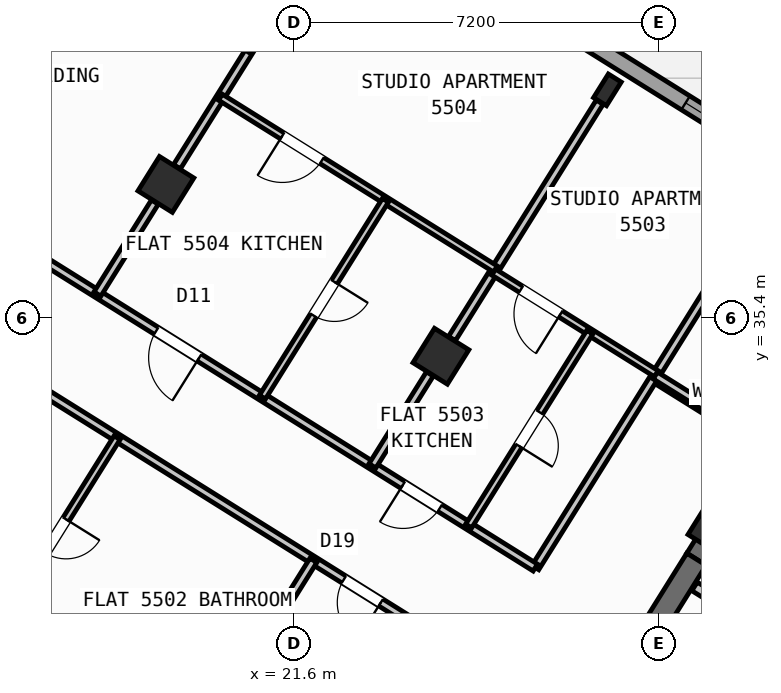
"""IFC4 building model, lengths in metres.
Left out: names, types, materials, properties, quantities, classifications, styles, units other than length and angle.
Written with IfcOpenShell. Run it as: python <this file> out.ifc"""

import sys

from ifc_helpers import new_model, si_unit, direction, frame, frame_2d, origin, origin_2d, place, context, subcontext, project, spatial, rectangle, hollow_rectangle, i_section, extrude, source, transform, mapped, element, fill, save


model = new_model("IFC4")
c1 = context("Model", 3, precision=1e-05, world=origin(), true_north=direction((0.0, 1.0)))
c2 = subcontext(c1, "Body", "Model", "MODEL_VIEW")
j1 = project(units=[si_unit("LENGTHUNIT", "METRE"), si_unit("PLANEANGLEUNIT", "RADIAN")], contexts=[c1])
p1 = place(None, origin())
s1 = spatial("IfcSite", under=j1, at=p1, CompositionType="ELEMENT")
p2 = place(p1, origin())
s2 = spatial("IfcBuilding", under=s1, at=p2, CompositionType="ELEMENT")
p3 = place(p2, frame((0.0, 0.0, 218.4)))
s3 = spatial("IfcBuildingStorey", under=s2, at=p3, CompositionType="ELEMENT", Elevation=218.4)
p4 = place(p3, frame((40.531, 24.036, 0.0), z_axis=(0.0, 0.0, 1.0), x_axis=(-0.848048787466, 0.529918157905, 0.0)))
e1 = element("IfcWall", 1, at=p4, inside=s3, PredefinedType="SHEAR", context=c2, shape_type="SweptSolid", body=[
    extrude(rectangle(XDim=13.04, YDim=0.45, at=frame_2d((6.52, 0.0))), origin(), (0.0, 0.0, 1.0), 3.35),
])
p5 = place(p3, frame((29.544, 30.636, 0.0), z_axis=(0.0, 0.0, 1.0), x_axis=(-0.529902075036, -0.848058836916, 0.0)))
e2 = element("IfcWall", 2, at=p5, inside=s3, PredefinedType="SHEAR", context=c2, shape_type="SweptSolid", body=[
    extrude(rectangle(XDim=3.625, YDim=0.45, at=frame_2d((1.812, 0.0))), origin(), (0.0, 0.0, 1.0), 3.35),
])
m1 = source(origin(), c2, "Body", "SweptSolid", [
    extrude(hollow_rectangle(XDim=0.8, YDim=0.8, WallThickness=0.032, at=origin_2d()), origin(), (0.0, 0.0, 1.0), 3.6),
])
p6 = place(p3, frame((29.928, 31.251, 0.0), z_axis=(0.0, 0.0, 1.0), x_axis=(-0.848048096156, 0.529919264233, 0.0)))
e3 = element("IfcColumn", 3, at=p6, inside=s3, PredefinedType="COLUMN", context=c2, shape_type="MappedRepresentation", body=[
    mapped(m1, transform((0.0, 0.0, 0.0), scale=1.0)),
])
m2 = source(origin(), c2, "Body", "SweptSolid", [
    extrude(i_section(OverallWidth=0.3, OverallDepth=0.55, WebThickness=0.015, FlangeThickness=0.029, at=origin_2d()), origin(), (0.0, 0.0, 1.0), 3.6),
])
p7 = place(p3, frame((27.786, 39.901, 0.0), z_axis=(0.0, 0.0, 1.0), x_axis=(-0.848048096156, 0.529919264233, 0.0)))
e4 = element("IfcColumn", 4, at=p7, inside=s3, PredefinedType="COLUMN", context=c2, shape_type="MappedRepresentation", body=[
    mapped(m2, transform((0.0, 0.0, 0.0), scale=1.0)),
])
for number, where, z_axis, x_axis in (
    (5, (24.5, 34.643, 0.0), (0.0, 0.0, 1.0), (-0.848, 0.53, 0.0)),
    (6, (19.073, 38.034, 0.0), (0.0, 0.0, 1.0), (-0.848, 0.53, 0.0)),
):
    element("IfcColumn", number, at=place(p3, frame(where, z_axis=z_axis, x_axis=x_axis)), inside=s3, PredefinedType="COLUMN", context=c2, shape_type="MappedRepresentation", body=[
        mapped(m1, transform((0.0, 0.0, 0.0), scale=1.0)),
    ])
p8 = place(p3, frame((5.7, 28.71, 0.0), z_axis=(0.0, 0.0, 1.0), x_axis=(0.529923711467, 0.8480453172, 0.0)))
e7 = element("IfcWall", 7, at=p8, inside=s3, PredefinedType="STANDARD", context=c2, shape_type="SweptSolid", body=[
    extrude(rectangle(XDim=21.587, YDim=0.32, at=frame_2d((10.794, 0.0))), origin(), (0.0, 0.0, 1.0), 2.825),
])
p9 = place(p8, frame((2.319, 0.0, 0.9)))
e8 = element("IfcOpeningElement", 8, at=p9, cuts=e7, PredefinedType="OPENING", context=c2, shape_type="SweptSolid", body=[
    extrude(rectangle(XDim=1.65, YDim=1.45, at=frame_2d((0.825, 0.725))), frame((0.0, 0.17, 0.0), z_axis=(0.0, -1.0, 0.0), x_axis=(1.0, 0.0, 0.0)), (0.0, 0.0, 1.0), 0.34),
])
p10 = place(p8, frame((8.629, 0.0, 1.0)))
e9 = element("IfcOpeningElement", 9, at=p10, cuts=e7, PredefinedType="OPENING", context=c2, shape_type="SweptSolid", body=[
    extrude(rectangle(XDim=0.9, YDim=1.25, at=frame_2d((0.45, 0.625))), frame((0.0, 0.17, 0.0), z_axis=(0.0, -1.0, 0.0), x_axis=(1.0, 0.0, 0.0)), (0.0, 0.0, 1.0), 0.34),
])
p11 = place(p8, frame((13.159, 0.0, 1.0)))
e10 = element("IfcOpeningElement", 10, at=p11, cuts=e7, PredefinedType="OPENING", context=c2, shape_type="SweptSolid", body=[
    extrude(rectangle(XDim=0.9, YDim=1.25, at=frame_2d((0.45, 0.625))), frame((0.0, 0.17, 0.0), z_axis=(0.0, -1.0, 0.0), x_axis=(1.0, 0.0, 0.0)), (0.0, 0.0, 1.0), 0.34),
])
p12 = place(p8, frame((16.232, 0.0, 1.0)))
e11 = element("IfcOpeningElement", 11, at=p12, cuts=e7, PredefinedType="OPENING", context=c2, shape_type="SweptSolid", body=[
    extrude(rectangle(XDim=0.9, YDim=1.25, at=frame_2d((0.45, 0.625))), frame((0.0, 0.17, 0.0), z_axis=(0.0, -1.0, 0.0), x_axis=(1.0, 0.0, 0.0)), (0.0, 0.0, 1.0), 0.34),
])
p13 = place(p8, frame((18.925, 0.0, 0.9)))
e12 = element("IfcOpeningElement", 12, at=p13, cuts=e7, PredefinedType="OPENING", context=c2, shape_type="SweptSolid", body=[
    extrude(rectangle(XDim=1.35, YDim=1.45, at=frame_2d((0.675, 0.725))), frame((0.0, 0.17, 0.0), z_axis=(0.0, -1.0, 0.0), x_axis=(1.0, 0.0, 0.0)), (0.0, 0.0, 1.0), 0.34),
])
p14 = place(p3, frame((17.424, 47.083, 0.0), z_axis=(0.0, 0.0, 1.0), x_axis=(0.848049927979, -0.529916332693, 0.0)))
e13 = element("IfcWall", 13, at=p14, inside=s3, PredefinedType="STANDARD", context=c2, shape_type="SweptSolid", body=[
    extrude(rectangle(XDim=29.223, YDim=0.32, at=frame_2d((14.612, 0.0))), origin(), (0.0, 0.0, 1.0), 3.35),
])
p15 = place(p14, frame((3.77, 0.0, 0.0)))
e14 = element("IfcOpeningElement", 14, at=p15, cuts=e13, PredefinedType="OPENING", context=c2, shape_type="SweptSolid", body=[
    extrude(rectangle(XDim=1.05, YDim=2.15, at=frame_2d((0.525, 1.075))), frame((0.0, 0.17, 0.0), z_axis=(0.0, -1.0, 0.0), x_axis=(1.0, 0.0, 0.0)), (0.0, 0.0, 1.0), 0.34),
])
p16 = place(p14, frame((1.125, 0.0, 0.9)))
e15 = element("IfcOpeningElement", 15, at=p16, cuts=e13, PredefinedType="OPENING", context=c2, shape_type="SweptSolid", body=[
    extrude(rectangle(XDim=1.65, YDim=1.45, at=frame_2d((0.825, 0.725))), frame((0.0, 0.17, 0.0), z_axis=(0.0, -1.0, 0.0), x_axis=(1.0, 0.0, 0.0)), (0.0, 0.0, 1.0), 0.34),
])
p17 = place(p14, frame((7.384, 0.0, 0.9)))
e16 = element("IfcOpeningElement", 16, at=p17, cuts=e13, PredefinedType="OPENING", context=c2, shape_type="SweptSolid", body=[
    extrude(rectangle(XDim=1.35, YDim=1.45, at=frame_2d((0.675, 0.725))), frame((0.0, 0.17, 0.0), z_axis=(0.0, -1.0, 0.0), x_axis=(1.0, 0.0, 0.0)), (0.0, 0.0, 1.0), 0.34),
])
p18 = place(p14, frame((10.054, 0.0, 0.9)))
e17 = element("IfcOpeningElement", 17, at=p18, cuts=e13, PredefinedType="OPENING", context=c2, shape_type="SweptSolid", body=[
    extrude(rectangle(XDim=1.35, YDim=1.45, at=frame_2d((0.675, 0.725))), frame((0.0, 0.17, 0.0), z_axis=(0.0, -1.0, 0.0), x_axis=(1.0, 0.0, 0.0)), (0.0, 0.0, 1.0), 0.34),
])
p19 = place(p14, frame((14.039, 0.0, 1.0)))
e18 = element("IfcOpeningElement", 18, at=p19, cuts=e13, PredefinedType="OPENING", context=c2, shape_type="SweptSolid", body=[
    extrude(rectangle(XDim=0.9, YDim=1.25, at=frame_2d((0.45, 0.625))), frame((0.0, 0.17, 0.0), z_axis=(0.0, -1.0, 0.0), x_axis=(1.0, 0.0, 0.0)), (0.0, 0.0, 1.0), 0.34),
])
p20 = place(p14, frame((17.254, 0.0, 1.0)))
e19 = element("IfcOpeningElement", 19, at=p20, cuts=e13, PredefinedType="OPENING", context=c2, shape_type="SweptSolid", body=[
    extrude(rectangle(XDim=0.9, YDim=1.25, at=frame_2d((0.45, 0.625))), frame((0.0, 0.17, 0.0), z_axis=(0.0, -1.0, 0.0), x_axis=(1.0, 0.0, 0.0)), (0.0, 0.0, 1.0), 0.34),
])
p21 = place(p14, frame((20.161, 0.0, 0.9)))
e20 = element("IfcOpeningElement", 20, at=p21, cuts=e13, PredefinedType="OPENING", context=c2, shape_type="SweptSolid", body=[
    extrude(rectangle(XDim=1.35, YDim=1.45, at=frame_2d((0.675, 0.725))), frame((0.0, 0.17, 0.0), z_axis=(0.0, -1.0, 0.0), x_axis=(1.0, 0.0, 0.0)), (0.0, 0.0, 1.0), 0.34),
])
p22 = place(p14, frame((22.846, 0.0, 0.9)))
e21 = element("IfcOpeningElement", 21, at=p22, cuts=e13, PredefinedType="OPENING", context=c2, shape_type="SweptSolid", body=[
    extrude(rectangle(XDim=1.35, YDim=1.45, at=frame_2d((0.675, 0.725))), frame((0.0, 0.17, 0.0), z_axis=(0.0, -1.0, 0.0), x_axis=(1.0, 0.0, 0.0)), (0.0, 0.0, 1.0), 0.34),
])
p23 = place(p14, frame((26.898, 0.0, 1.0)))
e22 = element("IfcOpeningElement", 22, at=p23, cuts=e13, PredefinedType="OPENING", context=c2, shape_type="SweptSolid", body=[
    extrude(rectangle(XDim=0.9, YDim=1.25, at=frame_2d((0.45, 0.625))), frame((0.0, 0.17, 0.0), z_axis=(0.0, -1.0, 0.0), x_axis=(1.0, 0.0, 0.0)), (0.0, 0.0, 1.0), 0.34),
])
p24 = place(p3, frame((33.363, 27.69, 0.0), z_axis=(0.0, 0.0, 1.0), x_axis=(-0.84804957148, 0.529916903215, 0.0)))
e23 = element("IfcWall", 23, at=p24, inside=s3, PredefinedType="STANDARD", context=c2, shape_type="SweptSolid", body=[
    extrude(rectangle(XDim=4.548, YDim=0.2, at=frame_2d((2.274, 0.0))), origin(), (0.0, 0.0, 1.0), 3.34),
])
p25 = place(p3, frame((30.914, 32.829, 0.0), z_axis=(0.0, 0.0, 1.0), x_axis=(-0.848008813643, 0.529982124211, 0.0)))
e24 = element("IfcWall", 24, at=p25, inside=s3, PredefinedType="PARTITIONING", context=c2, shape_type="SweptSolid", body=[
    extrude(rectangle(XDim=2.61, YDim=0.16, at=frame_2d((1.305, 0.0))), origin(), (0.0, 0.0, 1.0), 3.34),
])
p26 = place(p3, frame((31.239, 38.274, 0.0), z_axis=(0.0, 0.0, 1.0), x_axis=(-0.529920220799, -0.848047498427, 0.0)))
e25 = element("IfcWall", 25, at=p26, inside=s3, PredefinedType="PARTITIONING", context=c2, shape_type="SweptSolid", body=[
    extrude(rectangle(XDim=9.2, YDim=0.16, at=frame_2d((4.6, 0.0))), origin(), (0.0, 0.0, 1.0), 3.34),
])
p27 = place(p3, frame((26.363, 30.472, 0.0), z_axis=(0.0, 0.0, 1.0), x_axis=(-0.848052408131, 0.529912363569, 0.0)))
e26 = element("IfcWall", 26, at=p27, inside=s3, PredefinedType="PARTITIONING", context=c2, shape_type="SweptSolid", body=[
    extrude(rectangle(XDim=16.73, YDim=0.16, at=frame_2d((8.365, 0.0))), origin(), (0.0, 0.0, 1.0), 3.34),
])
p28 = place(p27, frame((2.22, 0.0, 0.0)))
e27 = element("IfcOpeningElement", 27, at=p28, cuts=e26, PredefinedType="OPENING", context=c2, shape_type="SweptSolid", body=[
    extrude(rectangle(XDim=0.86, YDim=2.05, at=frame_2d((0.43, 1.025))), frame((0.0, 0.09, 0.0), z_axis=(0.0, -1.0, 0.0), x_axis=(1.0, 0.0, 0.0)), (0.0, 0.0, 1.0), 0.18),
])
p29 = place(p27, frame((7.82, 0.0, 0.0)))
e28 = element("IfcOpeningElement", 28, at=p29, cuts=e26, PredefinedType="OPENING", context=c2, shape_type="SweptSolid", body=[
    extrude(rectangle(XDim=1.0, YDim=2.1, at=frame_2d((0.5, 1.05))), frame((0.0, 0.09, 0.0), z_axis=(0.0, -1.0, 0.0), x_axis=(1.0, 0.0, 0.0)), (0.0, 0.0, 1.0), 0.18),
])
p30 = place(p27, frame((12.95, 0.0, 0.0)))
e29 = element("IfcOpeningElement", 29, at=p30, cuts=e26, PredefinedType="OPENING", context=c2, shape_type="SweptSolid", body=[
    extrude(rectangle(XDim=1.0, YDim=2.1, at=frame_2d((0.5, 1.05))), frame((0.0, 0.09, 0.0), z_axis=(0.0, -1.0, 0.0), x_axis=(1.0, 0.0, 0.0)), (0.0, 0.0, 1.0), 0.18),
])
p31 = place(p3, frame((25.198, 28.606, 0.0), z_axis=(0.0, 0.0, 1.0), x_axis=(-0.848052408131, 0.529912363569, 0.0)))
e30 = element("IfcWall", 30, at=p31, inside=s3, PredefinedType="PARTITIONING", context=c2, shape_type="SweptSolid", body=[
    extrude(rectangle(XDim=16.73, YDim=0.16, at=frame_2d((8.365, 0.0))), origin(), (0.0, 0.0, 1.0), 3.34),
])
p32 = place(p31, frame((2.22, 0.0, 0.0)))
e31 = element("IfcOpeningElement", 31, at=p32, cuts=e30, PredefinedType="OPENING", context=c2, shape_type="SweptSolid", body=[
    extrude(rectangle(XDim=0.86, YDim=2.05, at=frame_2d((0.43, 1.025))), frame((0.0, 0.09, 0.0), z_axis=(0.0, -1.0, 0.0), x_axis=(1.0, 0.0, 0.0)), (0.0, 0.0, 1.0), 0.18),
])
p33 = place(p31, frame((12.084, 0.0, 0.0)))
e32 = element("IfcOpeningElement", 32, at=p33, cuts=e30, PredefinedType="OPENING", context=c2, shape_type="SweptSolid", body=[
    extrude(rectangle(XDim=1.0, YDim=2.1, at=frame_2d((0.5, 1.05))), frame((0.0, 0.09, 0.0), z_axis=(0.0, -1.0, 0.0), x_axis=(1.0, 0.0, 0.0)), (0.0, 0.0, 1.0), 0.18),
])
p34 = place(p3, frame((21.983, 30.615, 0.0), z_axis=(0.0, 0.0, 1.0), x_axis=(-0.529978410432, -0.848011134641, 0.0)))
e33 = element("IfcWall", 33, at=p34, inside=s3, PredefinedType="PARTITIONING", context=c2, shape_type="SweptSolid", body=[
    extrude(rectangle(XDim=2.138, YDim=0.16, at=frame_2d((1.069, 0.0))), origin(), (0.0, 0.0, 1.0), 2.825),
])
p35 = place(p3, frame((19.556, 26.73, 0.0), z_axis=(0.0, 0.0, 1.0), x_axis=(-0.848043949058, 0.52992590092, 0.0)))
e34 = element("IfcWall", 34, at=p35, inside=s3, PredefinedType="PLUMBINGWALL", context=c2, shape_type="SweptSolid", body=[
    extrude(rectangle(XDim=12.92, YDim=0.14, at=frame_2d((6.46, 0.0))), origin(), (0.0, 0.0, 1.0), 3.34),
])
p36 = place(p35, frame((5.849, 0.0, 0.0)))
e35 = element("IfcOpeningElement", 35, at=p36, cuts=e34, PredefinedType="OPENING", context=c2, shape_type="SweptSolid", body=[
    extrude(rectangle(XDim=0.92, YDim=2.08, at=frame_2d((0.46, 1.04))), frame((0.0, 0.08, 0.0), z_axis=(0.0, -1.0, 0.0), x_axis=(1.0, 0.0, 0.0)), (0.0, 0.0, 1.0), 0.16),
])
p37 = place(p3, frame((18.109, 33.035, 0.0), z_axis=(0.0, 0.0, 1.0), x_axis=(-0.529893526057, -0.848064178611, 0.0)))
e36 = element("IfcWall", 36, at=p37, inside=s3, PredefinedType="PLUMBINGWALL", context=c2, shape_type="SweptSolid", body=[
    extrude(rectangle(XDim=4.58, YDim=0.14, at=frame_2d((2.29, 0.0))), origin(), (0.0, 0.0, 1.0), 3.34),
])
p38 = place(p37, frame((1.9, 0.0, 0.0)))
e37 = element("IfcOpeningElement", 37, at=p38, cuts=e36, PredefinedType="OPENING", context=c2, shape_type="SweptSolid", body=[
    extrude(rectangle(XDim=0.78, YDim=2.05, at=frame_2d((0.39, 1.025))), frame((0.0, 0.08, 0.0), z_axis=(0.0, -1.0, 0.0), x_axis=(1.0, 0.0, 0.0)), (0.0, 0.0, 1.0), 0.16),
])
p39 = place(p3, frame((27.634, 39.657, 0.0), z_axis=(0.0, 0.0, 1.0), x_axis=(-0.529899205623, -0.848060629837, 0.0)))
e38 = element("IfcWall", 38, at=p39, inside=s3, PredefinedType="PARTITIONING", context=c2, shape_type="SweptSolid", body=[
    extrude(rectangle(XDim=5.501, YDim=0.16, at=frame_2d((2.75, 0.0))), origin(), (0.0, 0.0, 1.0), 2.825),
])
p40 = place(p3, frame((24.282, 34.293, 0.0), z_axis=(0.0, 0.0, 1.0), x_axis=(-0.529927092104, -0.84804320471, 0.0)))
e39 = element("IfcWall", 39, at=p40, inside=s3, PredefinedType="PARTITIONING", context=c2, shape_type="SweptSolid", body=[
    extrude(rectangle(XDim=2.138, YDim=0.16, at=frame_2d((1.069, 0.0))), origin(), (0.0, 0.0, 1.0), 2.825),
])
p41 = place(p3, frame((28.753, 34.297, 0.0), z_axis=(0.0, 0.0, 1.0), x_axis=(-0.848059820872, 0.529900500304, 0.0)))
e40 = element("IfcWall", 40, at=p41, inside=s3, PredefinedType="PLUMBINGWALL", context=c2, shape_type="SweptSolid", body=[
    extrude(rectangle(XDim=3.79, YDim=0.14, at=frame_2d((1.895, 0.0))), origin(), (0.0, 0.0, 1.0), 3.34),
])
p42 = place(p41, frame((2.23, 0.0, 0.0)))
e41 = element("IfcOpeningElement", 41, at=p42, cuts=e40, PredefinedType="OPENING", context=c2, shape_type="SweptSolid", body=[
    extrude(rectangle(XDim=0.92, YDim=2.08, at=frame_2d((0.46, 1.04))), frame((0.0, 0.08, 0.0), z_axis=(0.0, -1.0, 0.0), x_axis=(1.0, 0.0, 0.0)), (0.0, 0.0, 1.0), 0.16),
])
p43 = place(p3, frame((27.439, 35.118, 0.0), z_axis=(0.0, 0.0, 1.0), x_axis=(-0.529911350634, -0.84805304107, 0.0)))
e42 = element("IfcWall", 42, at=p43, inside=s3, PredefinedType="PLUMBINGWALL", context=c2, shape_type="SweptSolid", body=[
    extrude(rectangle(XDim=4.51, YDim=0.14, at=frame_2d((2.255, 0.0))), origin(), (0.0, 0.0, 1.0), 2.995),
])
p44 = place(p43, frame((1.865, 0.0, 0.0)))
e43 = element("IfcOpeningElement", 43, at=p44, cuts=e42, PredefinedType="OPENING", context=c2, shape_type="SweptSolid", body=[
    extrude(rectangle(XDim=0.78, YDim=2.05, at=frame_2d((0.39, 1.025))), frame((0.0, 0.08, 0.0), z_axis=(0.0, -1.0, 0.0), x_axis=(1.0, 0.0, 0.0)), (0.0, 0.0, 1.0), 0.16),
])
p45 = place(p3, frame((22.206, 43.049, 0.0), z_axis=(0.0, 0.0, 1.0), x_axis=(-0.529919150083, -0.848048167486, 0.0)))
e44 = element("IfcWall", 44, at=p45, inside=s3, PredefinedType="PARTITIONING", context=c2, shape_type="SweptSolid", body=[
    extrude(rectangle(XDim=5.501, YDim=0.16, at=frame_2d((2.75, 0.0))), origin(), (0.0, 0.0, 1.0), 2.825),
])
p46 = place(p3, frame((18.854, 37.685, 0.0), z_axis=(0.0, 0.0, 1.0), x_axis=(-0.52989628283, -0.848062456098, 0.0)))
e45 = element("IfcWall", 45, at=p46, inside=s3, PredefinedType="PARTITIONING", context=c2, shape_type="SweptSolid", body=[
    extrude(rectangle(XDim=2.138, YDim=0.16, at=frame_2d((1.069, 0.0))), origin(), (0.0, 0.0, 1.0), 2.825),
])
p47 = place(p3, frame((25.576, 36.365, 0.0), z_axis=(0.0, 0.0, 1.0), x_axis=(-0.848056163074, 0.529906354247, 0.0)))
e46 = element("IfcWall", 46, at=p47, inside=s3, PredefinedType="PLUMBINGWALL", context=c2, shape_type="SweptSolid", body=[
    extrude(rectangle(XDim=6.4, YDim=0.14, at=frame_2d((3.2, 0.0))), origin(), (0.0, 0.0, 1.0), 3.34),
])
p48 = place(p47, frame((4.04, 0.0, 0.0)))
e47 = element("IfcOpeningElement", 47, at=p48, cuts=e46, PredefinedType="OPENING", context=c2, shape_type="SweptSolid", body=[
    extrude(rectangle(XDim=0.92, YDim=2.08, at=frame_2d((0.46, 1.04))), frame((0.0, 0.08, 0.0), z_axis=(0.0, -1.0, 0.0), x_axis=(1.0, 0.0, 0.0)), (0.0, 0.0, 1.0), 0.16),
])
p49 = place(p3, frame((23.405, 37.721, 0.0), z_axis=(0.0, 0.0, 1.0), x_axis=(-0.529955816375, -0.848025254748, 0.0)))
e48 = element("IfcWall", 48, at=p49, inside=s3, PredefinedType="PLUMBINGWALL", context=c2, shape_type="SweptSolid", body=[
    extrude(rectangle(XDim=4.58, YDim=0.14, at=frame_2d((2.29, 0.0))), origin(), (0.0, 0.0, 1.0), 3.34),
])
p50 = place(p49, frame((1.9, 0.0, 0.0)))
e49 = element("IfcOpeningElement", 49, at=p50, cuts=e48, PredefinedType="OPENING", context=c2, shape_type="SweptSolid", body=[
    extrude(rectangle(XDim=0.78, YDim=2.05, at=frame_2d((0.39, 1.025))), frame((0.0, 0.08, 0.0), z_axis=(0.0, -1.0, 0.0), x_axis=(1.0, 0.0, 0.0)), (0.0, 0.0, 1.0), 0.16),
])
p51 = place(p3, frame((20.733, 40.69, 0.0), z_axis=(0.0, 0.0, 1.0), x_axis=(-0.848048787466, 0.529918157905, 0.0)))
e50 = element("IfcWall", 50, at=p51, inside=s3, PredefinedType="PARTITIONING", context=c2, shape_type="SweptSolid", body=[
    extrude(rectangle(XDim=6.52, YDim=0.11, at=frame_2d((3.26, 0.0))), origin(), (0.0, 0.0, 1.0), 3.34),
])
p52 = place(p51, frame((2.8, 0.0, 0.0)))
e51 = element("IfcOpeningElement", 51, at=p52, cuts=e50, PredefinedType="OPENING", context=c2, shape_type="SweptSolid", body=[
    extrude(rectangle(XDim=0.92, YDim=2.08, at=frame_2d((0.46, 1.04))), frame((0.0, 0.065, 0.0), z_axis=(0.0, -1.0, 0.0), x_axis=(1.0, 0.0, 0.0)), (0.0, 0.0, 1.0), 0.13),
])
p53 = place(p3, frame((41.936, 26.012, 0.0), z_axis=(0.0, 0.0, 1.0), x_axis=(-0.848051154596, 0.529914369676, 0.0)))
e52 = element("IfcWall", 52, at=p53, inside=s3, PredefinedType="PARTITIONING", context=c2, shape_type="SweptSolid", body=[
    extrude(rectangle(XDim=15.57, YDim=0.16, at=frame_2d((7.785, 0.0))), origin(), (0.0, 0.0, 1.0), 3.34),
])
p54 = place(p53, frame((3.415, 0.0, 0.0)))
e53 = element("IfcOpeningElement", 53, at=p54, cuts=e52, PredefinedType="OPENING", context=c2, shape_type="SweptSolid", body=[
    extrude(rectangle(XDim=1.0, YDim=2.1, at=frame_2d((0.5, 1.05))), frame((0.0, 0.09, 0.0), z_axis=(0.0, -1.0, 0.0), x_axis=(1.0, 0.0, 0.0)), (0.0, 0.0, 1.0), 0.18),
])
p55 = place(p53, frame((10.565, 0.0, 0.0)))
e54 = element("IfcOpeningElement", 54, at=p55, cuts=e52, PredefinedType="OPENING", context=c2, shape_type="SweptSolid", body=[
    extrude(rectangle(XDim=1.0, YDim=2.1, at=frame_2d((0.5, 1.05))), frame((0.0, 0.09, 0.0), z_axis=(0.0, -1.0, 0.0), x_axis=(1.0, 0.0, 0.0)), (0.0, 0.0, 1.0), 0.18),
])
m3 = source(origin(), c2, "Body", "SweptSolid", [
    extrude(rectangle(XDim=0.9, YDim=1.25, at=frame_2d((0.45, 0.625))), frame((0.0, 0.03, 0.0), z_axis=(0.0, -1.0, 0.0), x_axis=(1.0, 0.0, 0.0)), (0.0, 0.0, 1.0), 0.06),
])
p56 = place(p19, origin())
e55 = element("IfcWindow", 55, at=p56, inside=s3, PartitioningType="SINGLE_PANEL", PredefinedType="WINDOW", context=c2, shape_type="MappedRepresentation", body=[
    mapped(m3, transform((0.0, 0.0, 0.0), scale=1.0)),
])
fill(e18, e55)
m4 = source(origin(), c2, "Body", "SweptSolid", [
    extrude(rectangle(XDim=0.86, YDim=2.05, at=frame_2d((0.43, 1.025))), frame((0.0, 0.025, 0.0), z_axis=(0.0, -1.0, 0.0), x_axis=(1.0, 0.0, 0.0)), (0.0, 0.0, 1.0), 0.05),
])
p57 = place(p32, origin())
e56 = element("IfcDoor", 56, at=p57, inside=s3, OperationType="SINGLE_SWING_LEFT", PredefinedType="DOOR", context=c2, shape_type="MappedRepresentation", body=[
    mapped(m4, transform((0.0, 0.0, 0.0), scale=1.0)),
])
fill(e31, e56)
m5 = source(origin(), c2, "Body", "SweptSolid", [
    extrude(rectangle(XDim=0.78, YDim=2.05, at=frame_2d((0.39, 1.025))), frame((0.0, 0.025, 0.0), z_axis=(0.0, -1.0, 0.0), x_axis=(1.0, 0.0, 0.0)), (0.0, 0.0, 1.0), 0.05),
])
p58 = place(p38, origin())
e57 = element("IfcDoor", 57, at=p58, inside=s3, OperationType="SINGLE_SWING_LEFT", PredefinedType="DOOR", context=c2, shape_type="MappedRepresentation", body=[
    mapped(m5, transform((0.0, 0.0, 0.0), scale=1.0)),
])
fill(e37, e57)
p59 = place(p28, origin())
e58 = element("IfcDoor", 58, at=p59, inside=s3, OperationType="SINGLE_SWING_RIGHT", PredefinedType="DOOR", context=c2, shape_type="MappedRepresentation", body=[
    mapped(m4, transform((0.0, 0.0, 0.0), scale=1.0)),
])
fill(e27, e58)
m6 = source(origin(), c2, "Body", "SweptSolid", [
    extrude(rectangle(XDim=0.92, YDim=2.08, at=frame_2d((0.46, 1.04))), frame((0.0, 0.025, 0.0), z_axis=(0.0, -1.0, 0.0), x_axis=(1.0, 0.0, 0.0)), (0.0, 0.0, 1.0), 0.05),
])
p60 = place(p42, origin())
e59 = element("IfcDoor", 59, at=p60, inside=s3, OperationType="SINGLE_SWING_LEFT", PredefinedType="DOOR", context=c2, shape_type="MappedRepresentation", body=[
    mapped(m6, transform((0.0, 0.0, 0.0), scale=1.0)),
])
fill(e41, e59)
p61 = place(p44, origin())
e60 = element("IfcDoor", 60, at=p61, inside=s3, OperationType="SINGLE_SWING_RIGHT", PredefinedType="DOOR", context=c2, shape_type="MappedRepresentation", body=[
    mapped(m5, transform((0.0, 0.0, 0.0), scale=1.0)),
])
fill(e43, e60)
m7 = source(origin(), c2, "Body", "SweptSolid", [
    extrude(rectangle(XDim=1.0, YDim=2.1, at=frame_2d((0.5, 1.05))), frame((0.0, 0.025, 0.0), z_axis=(0.0, -1.0, 0.0), x_axis=(1.0, 0.0, 0.0)), (0.0, 0.0, 1.0), 0.05),
])
p62 = place(p29, origin())
e61 = element("IfcDoor", 61, at=p62, inside=s3, OperationType="SINGLE_SWING_LEFT", PredefinedType="DOOR", context=c2, shape_type="MappedRepresentation", body=[
    mapped(m7, transform((0.0, 0.0, 0.0), scale=1.0)),
])
fill(e28, e61)
p63 = place(p48, origin())
e62 = element("IfcDoor", 62, at=p63, inside=s3, OperationType="SINGLE_SWING_RIGHT", PredefinedType="DOOR", context=c2, shape_type="MappedRepresentation", body=[
    mapped(m6, transform((0.0, 0.0, 0.0), scale=1.0)),
])
fill(e47, e62)
p64 = place(p50, origin())
e63 = element("IfcDoor", 63, at=p64, inside=s3, OperationType="SINGLE_SWING_LEFT", PredefinedType="DOOR", context=c2, shape_type="MappedRepresentation", body=[
    mapped(m5, transform((0.0, 0.0, 0.0), scale=1.0)),
])
fill(e49, e63)
save(model, sys.argv[1])
